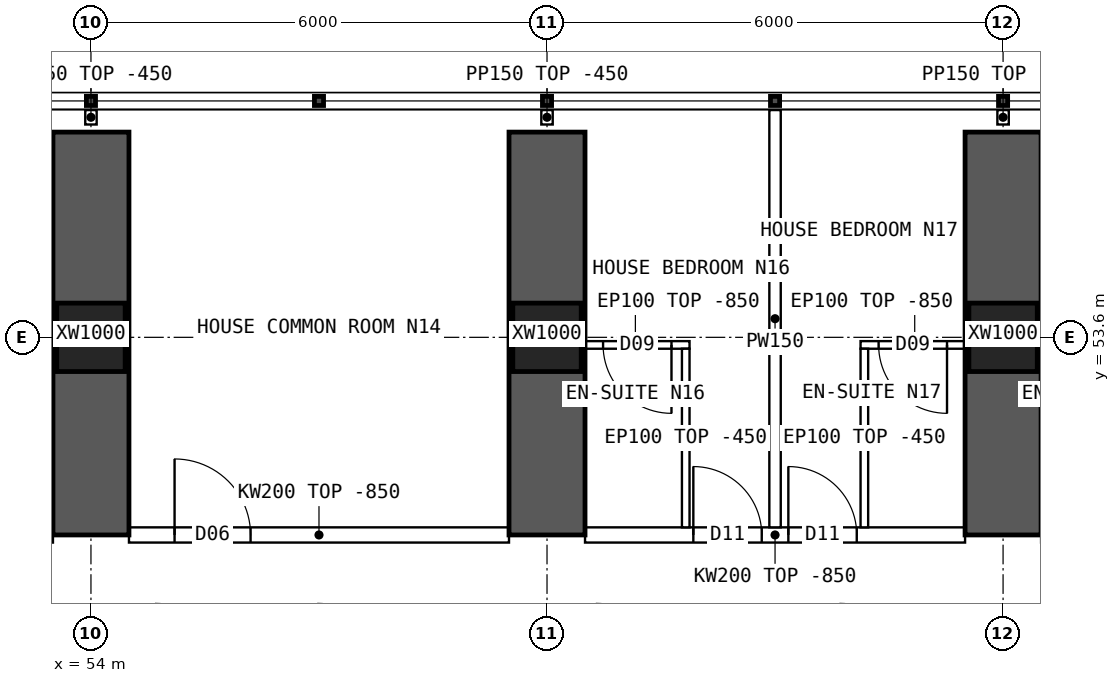
"""IFC4 building model, lengths in metres.
Left out: names, types, materials, properties, quantities, classifications, styles, units other than length and angle.
Written with IfcOpenShell. Run it as: python <this file> out.ifc"""

import sys

from ifc_helpers import new_model, si_unit, direction, frame, frame_2d, origin, origin_2d, place, context, subcontext, project, spatial, polyline, rectangle, hollow_rectangle, outline, extrude, element, fill, save


model = new_model("IFC4")
c1 = context("Model", 3, precision=1e-05, world=origin(), true_north=direction((0.0, 1.0)))
c2 = subcontext(c1, "Body", "Model", "MODEL_VIEW")
j1 = project(units=[si_unit("LENGTHUNIT", "METRE"), si_unit("PLANEANGLEUNIT", "RADIAN")], contexts=[c1])
p1 = place(None, origin())
s1 = spatial("IfcSite", under=j1, at=p1, CompositionType="ELEMENT")
p2 = place(p1, origin())
s2 = spatial("IfcBuilding", under=s1, at=p2, CompositionType="ELEMENT")
p3 = place(p2, frame((0.0, 0.0, 20.2)))
s3 = spatial("IfcBuildingStorey", under=s2, at=p3, CompositionType="ELEMENT", Elevation=20.2)
for number, where, z_axis, x_axis in (
    (1, (54.0, 53.6, 0.0), (0.0, 0.0, 1.0), (1.0, 0.0, 0.0)),
    (2, (60.0, 53.6, 0.0), (0.0, 0.0, 1.0), (1.0, 0.0, 0.0)),
    (3, (66.0, 53.6, 0.0), (0.0, 0.0, 1.0), (1.0, 0.0, 0.0)),
):
    element("IfcColumn", number, at=place(p3, frame(where, z_axis=z_axis, x_axis=x_axis)), inside=s3, PredefinedType="COLUMN", context=c2, shape_type="SweptSolid", body=[
        extrude(hollow_rectangle(XDim=0.9, YDim=0.9, WallThickness=0.09, at=origin_2d()), origin(), (0.0, 0.0, 1.0), 3.75),
    ])
for number, where, z_axis, x_axis in (
    (4, (54.0, 51.0, 0.0), (0.0, 0.0, 1.0), (0.0, 1.0, 0.0)),
    (5, (60.0, 51.0, 0.0), (0.0, 0.0, 1.0), (0.0, 1.0, 0.0)),
    (6, (66.0, 51.0, 0.0), (0.0, 0.0, 1.0), (0.0, 1.0, 0.0)),
):
    element("IfcWall", number, at=place(p3, frame(where, z_axis=z_axis, x_axis=x_axis)), inside=s3, PredefinedType="SHEAR", context=c2, shape_type="SweptSolid", body=[
        extrude(rectangle(XDim=5.3, YDim=1.0, at=frame_2d((2.65, 0.0))), origin(), (0.0, 0.0, 1.0), 3.75),
    ])
p4 = place(p3, frame((54.5, 51.0, 0.0), z_axis=(0.0, 0.0, 1.0), x_axis=(1.0, 0.0, 0.0)))
e7 = element("IfcWall", 7, at=p4, inside=s3, PredefinedType="SOLIDWALL", context=c2, shape_type="SweptSolid", body=[
    extrude(outline(polyline([(0.0, 0.0), (5.0, 0.0), (5.0, 2.9), (0.0, 2.9), (0.0, 0.0)])), frame((0.0, 0.1, 0.0), z_axis=(0.0, -1.0, 0.0), x_axis=(1.0, 0.0, 0.0)), (0.0, 0.0, 1.0), 0.2),
])
p5 = place(p4, frame((0.6, 0.0, 0.0)))
e8 = element("IfcOpeningElement", 8, at=p5, cuts=e7, PredefinedType="OPENING", context=c2, shape_type="SweptSolid", body=[
    extrude(rectangle(XDim=1.0, YDim=2.1, at=frame_2d((0.5, 1.05))), frame((0.0, 0.11, 0.0), z_axis=(0.0, -1.0, 0.0), x_axis=(1.0, 0.0, 0.0)), (0.0, 0.0, 1.0), 0.22),
])
p6 = place(p3, frame((60.5, 51.0, 0.0), z_axis=(0.0, 0.0, 1.0), x_axis=(1.0, 0.0, 0.0)))
e9 = element("IfcWall", 9, at=p6, inside=s3, PredefinedType="SOLIDWALL", context=c2, shape_type="SweptSolid", body=[
    extrude(outline(polyline([(0.0, 0.0), (5.0, 0.0), (5.0, 2.9), (0.0, 2.9), (0.0, 0.0)])), frame((0.0, 0.1, 0.0), z_axis=(0.0, -1.0, 0.0), x_axis=(1.0, 0.0, 0.0)), (0.0, 0.0, 1.0), 0.2),
])
p7 = place(p6, frame((1.425, 0.0, 0.0)))
e10 = element("IfcOpeningElement", 10, at=p7, cuts=e9, PredefinedType="OPENING", context=c2, shape_type="SweptSolid", body=[
    extrude(rectangle(XDim=0.9, YDim=2.1, at=frame_2d((0.45, 1.05))), frame((0.0, 0.11, 0.0), z_axis=(0.0, -1.0, 0.0), x_axis=(1.0, 0.0, 0.0)), (0.0, 0.0, 1.0), 0.22),
])
p8 = place(p6, frame((2.675, 0.0, 0.0)))
e11 = element("IfcOpeningElement", 11, at=p8, cuts=e9, PredefinedType="OPENING", context=c2, shape_type="SweptSolid", body=[
    extrude(rectangle(XDim=0.9, YDim=2.1, at=frame_2d((0.45, 1.05))), frame((0.0, 0.11, 0.0), z_axis=(0.0, -1.0, 0.0), x_axis=(1.0, 0.0, 0.0)), (0.0, 0.0, 1.0), 0.22),
])
p9 = place(p3, frame((52.125, 53.5, 0.0), z_axis=(0.0, 0.0, 1.0), x_axis=(1.0, 0.0, 0.0)))
e12 = element("IfcWall", 12, at=p9, inside=s3, PredefinedType="PARTITIONING", context=c2, shape_type="SweptSolid", body=[
    extrude(outline(polyline([(0.0, 0.0), (1.425, 0.0), (1.425, 2.9), (0.0, 2.9), (0.0, 0.0)])), frame((0.0, 0.05, 0.0), z_axis=(0.0, -1.0, 0.0), x_axis=(1.0, 0.0, 0.0)), (0.0, 0.0, 1.0), 0.1),
])
p10 = place(p9, frame((0.238, 0.0, 0.0)))
e13 = element("IfcOpeningElement", 13, at=p10, cuts=e12, PredefinedType="OPENING", context=c2, shape_type="SweptSolid", body=[
    extrude(rectangle(XDim=0.9, YDim=2.1, at=frame_2d((0.45, 1.05))), frame((0.0, 0.06, 0.0), z_axis=(0.0, -1.0, 0.0), x_axis=(1.0, 0.0, 0.0)), (0.0, 0.0, 1.0), 0.12),
])
p11 = place(p3, frame((63.0, 56.59, 0.0), z_axis=(0.0, 0.0, 1.0), x_axis=(0.0, -1.0, 0.0)))
e14 = element("IfcWall", 14, at=p11, inside=s3, PredefinedType="PARTITIONING", context=c2, shape_type="SweptSolid", body=[
    extrude(outline(polyline([(0.0, 0.0), (5.49, 0.0), (5.49, 2.9), (5.442, 2.9), (5.44, 3.3), (3.192, 3.3), (3.19, 2.9), (2.792, 2.9), (2.79, 3.3), (0.0, 3.3), (0.0, 0.0)])), frame((0.0, 0.075, 0.0), z_axis=(0.0, -1.0, 0.0), x_axis=(1.0, 0.0, 0.0)), (0.0, 0.0, 1.0), 0.15),
])
p12 = place(p3, frame((60.45, 53.5, 0.0), z_axis=(0.0, 0.0, 1.0), x_axis=(1.0, 0.0, 0.0)))
e15 = element("IfcWall", 15, at=p12, inside=s3, PredefinedType="PARTITIONING", context=c2, shape_type="SweptSolid", body=[
    extrude(outline(polyline([(0.0, 0.0), (1.425, 0.0), (1.425, 2.9), (0.0, 2.9), (0.0, 0.0)])), frame((0.0, 0.05, 0.0), z_axis=(0.0, -1.0, 0.0), x_axis=(1.0, 0.0, 0.0)), (0.0, 0.0, 1.0), 0.1),
])
p13 = place(p12, frame((0.288, 0.0, 0.0)))
e16 = element("IfcOpeningElement", 16, at=p13, cuts=e15, PredefinedType="OPENING", context=c2, shape_type="SweptSolid", body=[
    extrude(rectangle(XDim=0.9, YDim=2.1, at=frame_2d((0.45, 1.05))), frame((0.0, 0.06, 0.0), z_axis=(0.0, -1.0, 0.0), x_axis=(1.0, 0.0, 0.0)), (0.0, 0.0, 1.0), 0.12),
])
p14 = place(p3, frame((61.825, 53.45, 0.0), z_axis=(0.0, 0.0, 1.0), x_axis=(0.0, -1.0, 0.0)))
e17 = element("IfcWall", 17, at=p14, inside=s3, PredefinedType="PARTITIONING", context=c2, shape_type="SweptSolid", body=[
    extrude(outline(polyline([(0.0, 0.0), (2.35, 0.0), (2.35, 2.9), (2.302, 2.9), (2.3, 3.3), (0.052, 3.3), (0.05, 2.9), (0.0, 2.9), (0.0, 0.0)])), frame((0.0, 0.05, 0.0), z_axis=(0.0, -1.0, 0.0), x_axis=(1.0, 0.0, 0.0)), (0.0, 0.0, 1.0), 0.1),
])
p15 = place(p3, frame((64.125, 53.5, 0.0), z_axis=(0.0, 0.0, 1.0), x_axis=(1.0, 0.0, 0.0)))
e18 = element("IfcWall", 18, at=p15, inside=s3, PredefinedType="PARTITIONING", context=c2, shape_type="SweptSolid", body=[
    extrude(outline(polyline([(0.0, 0.0), (1.425, 0.0), (1.425, 2.9), (0.0, 2.9), (0.0, 0.0)])), frame((0.0, 0.05, 0.0), z_axis=(0.0, -1.0, 0.0), x_axis=(1.0, 0.0, 0.0)), (0.0, 0.0, 1.0), 0.1),
])
p16 = place(p15, frame((0.238, 0.0, 0.0)))
e19 = element("IfcOpeningElement", 19, at=p16, cuts=e18, PredefinedType="OPENING", context=c2, shape_type="SweptSolid", body=[
    extrude(rectangle(XDim=0.9, YDim=2.1, at=frame_2d((0.45, 1.05))), frame((0.0, 0.06, 0.0), z_axis=(0.0, -1.0, 0.0), x_axis=(1.0, 0.0, 0.0)), (0.0, 0.0, 1.0), 0.12),
])
p17 = place(p3, frame((64.175, 53.45, 0.0), z_axis=(0.0, 0.0, 1.0), x_axis=(0.0, -1.0, 0.0)))
e20 = element("IfcWall", 20, at=p17, inside=s3, PredefinedType="PARTITIONING", context=c2, shape_type="SweptSolid", body=[
    extrude(outline(polyline([(0.0, 0.0), (2.35, 0.0), (2.35, 2.9), (2.302, 2.9), (2.3, 3.3), (0.052, 3.3), (0.05, 2.9), (0.0, 2.9), (0.0, 0.0)])), frame((0.0, 0.05, 0.0), z_axis=(0.0, -1.0, 0.0), x_axis=(1.0, 0.0, 0.0)), (0.0, 0.0, 1.0), 0.1),
])
p18 = place(p3, frame((66.45, 53.5, 0.0), z_axis=(0.0, 0.0, 1.0), x_axis=(1.0, 0.0, 0.0)))
e21 = element("IfcWall", 21, at=p18, inside=s3, PredefinedType="PARTITIONING", context=c2, shape_type="SweptSolid", body=[
    extrude(outline(polyline([(0.0, 0.0), (1.425, 0.0), (1.425, 2.9), (0.0, 2.9), (0.0, 0.0)])), frame((0.0, 0.05, 0.0), z_axis=(0.0, -1.0, 0.0), x_axis=(1.0, 0.0, 0.0)), (0.0, 0.0, 1.0), 0.1),
])
p19 = place(p18, frame((0.288, 0.0, 0.0)))
e22 = element("IfcOpeningElement", 22, at=p19, cuts=e21, PredefinedType="OPENING", context=c2, shape_type="SweptSolid", body=[
    extrude(rectangle(XDim=0.9, YDim=2.1, at=frame_2d((0.45, 1.05))), frame((0.0, 0.06, 0.0), z_axis=(0.0, -1.0, 0.0), x_axis=(1.0, 0.0, 0.0)), (0.0, 0.0, 1.0), 0.12),
])
for number, where, z_axis, x_axis in (
    (23, (54.0, 56.4, 0.0), (0.0, 0.0, 1.0), (0.0, 1.0, 0.0)),
    (24, (60.0, 56.4, 0.0), (0.0, 0.0, 1.0), (0.0, 1.0, 0.0)),
    (25, (66.0, 56.4, 0.0), (0.0, 0.0, 1.0), (0.0, 1.0, 0.0)),
):
    element("IfcWall", number, at=place(p3, frame(where, z_axis=z_axis, x_axis=x_axis)), inside=s3, PredefinedType="PARTITIONING", context=c2, shape_type="SweptSolid", body=[
        extrude(rectangle(XDim=0.19, YDim=0.15, at=frame_2d((0.095, 0.0))), origin(), (0.0, 0.0, 1.0), 3.3),
    ])
p20 = place(p5, origin())
e26 = element("IfcDoor", 26, at=p20, inside=s3, OperationType="SINGLE_SWING_LEFT", PredefinedType="DOOR", context=c2, shape_type="SweptSolid", body=[
    extrude(rectangle(XDim=1.0, YDim=2.1, at=frame_2d((0.5, 1.05))), frame((0.0, 0.025, 0.0), z_axis=(0.0, -1.0, 0.0), x_axis=(1.0, 0.0, 0.0)), (0.0, 0.0, 1.0), 0.05),
])
fill(e8, e26)
p21 = place(p13, origin())
e27 = element("IfcDoor", 27, at=p21, inside=s3, OperationType="SINGLE_SWING_RIGHT", PredefinedType="DOOR", context=c2, shape_type="SweptSolid", body=[
    extrude(rectangle(XDim=0.9, YDim=2.1, at=frame_2d((0.45, 1.05))), frame((0.0, 0.025, 0.0), z_axis=(0.0, -1.0, 0.0), x_axis=(1.0, 0.0, 0.0)), (0.0, 0.0, 1.0), 0.05),
])
fill(e16, e27)
p22 = place(p7, origin())
e28 = element("IfcDoor", 28, at=p22, inside=s3, OperationType="SINGLE_SWING_LEFT", PredefinedType="DOOR", context=c2, shape_type="SweptSolid", body=[
    extrude(rectangle(XDim=0.9, YDim=2.1, at=frame_2d((0.45, 1.05))), frame((0.0, 0.025, 0.0), z_axis=(0.0, -1.0, 0.0), x_axis=(1.0, 0.0, 0.0)), (0.0, 0.0, 1.0), 0.05),
])
fill(e10, e28)
p23 = place(p16, origin())
e29 = element("IfcDoor", 29, at=p23, inside=s3, OperationType="SINGLE_SWING_RIGHT", PredefinedType="DOOR", context=c2, shape_type="SweptSolid", body=[
    extrude(rectangle(XDim=0.9, YDim=2.1, at=frame_2d((0.45, 1.05))), frame((0.0, 0.025, 0.0), z_axis=(0.0, -1.0, 0.0), x_axis=(1.0, 0.0, 0.0)), (0.0, 0.0, 1.0), 0.05),
])
fill(e19, e29)
p24 = place(p8, origin())
e30 = element("IfcDoor", 30, at=p24, inside=s3, OperationType="SINGLE_SWING_LEFT", PredefinedType="DOOR", context=c2, shape_type="SweptSolid", body=[
    extrude(rectangle(XDim=0.9, YDim=2.1, at=frame_2d((0.45, 1.05))), frame((0.0, 0.025, 0.0), z_axis=(0.0, -1.0, 0.0), x_axis=(1.0, 0.0, 0.0)), (0.0, 0.0, 1.0), 0.05),
])
fill(e11, e30)
save(model, sys.argv[1])
